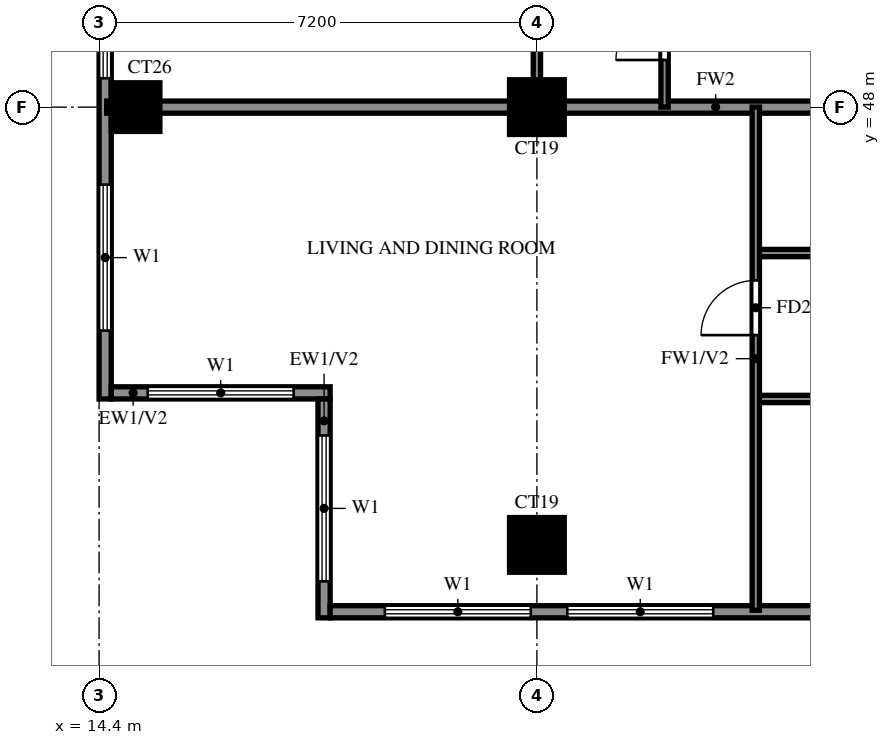
"""IFC4 building model, lengths in metres.
Left out: names, types, materials, properties, quantities, classifications, styles, units other than length and angle.
Written with IfcOpenShell. Run it as: python <this file> out.ifc"""

import sys

from ifc_helpers import new_model, si_unit, direction, frame, frame_2d, origin, origin_2d, place, context, subcontext, project, spatial, rectangle, extrude, source, transform, mapped, element, fill, save


model = new_model("IFC4")
c1 = context("Model", 3, precision=1e-05, world=origin(), true_north=direction((0.0, 1.0)))
c2 = subcontext(c1, "Body", "Model", "MODEL_VIEW")
j1 = project(units=[si_unit("LENGTHUNIT", "METRE"), si_unit("PLANEANGLEUNIT", "RADIAN")], contexts=[c1])
p1 = place(None, origin())
s1 = spatial("IfcSite", under=j1, at=p1, CompositionType="ELEMENT")
p2 = place(p1, origin())
s2 = spatial("IfcBuilding", under=s1, at=p2, CompositionType="ELEMENT")
p3 = place(p2, frame((0.0, 0.0, 199.0)))
s3 = spatial("IfcBuildingStorey", under=s2, at=p3, CompositionType="ELEMENT", Elevation=199.0)
m1 = source(origin(), c2, "Body", "SweptSolid", [
    extrude(rectangle(XDim=0.9, YDim=0.9, at=origin_2d()), origin(), (0.0, 0.0, 1.0), 3.2),
])
p4 = place(p3, frame((21.6, 40.8, 0.0), z_axis=(0.0, 0.0, 1.0), x_axis=(1.0, 0.0, 0.0)))
e1 = element("IfcColumn", 1, at=p4, inside=s3, PredefinedType="COLUMN", context=c2, shape_type="MappedRepresentation", body=[
    mapped(m1, transform((0.0, 0.0, 0.0))),
])
m2 = source(origin(), c2, "Body", "SweptSolid", [
    extrude(rectangle(XDim=0.8, YDim=0.8, at=origin_2d()), origin(), (0.0, 0.0, 1.0), 3.2),
])
p5 = place(p3, frame((15.0, 48.0, 0.0), z_axis=(0.0, 0.0, 1.0), x_axis=(1.0, 0.0, 0.0)))
e2 = element("IfcColumn", 2, at=p5, inside=s3, PredefinedType="COLUMN", context=c2, shape_type="MappedRepresentation", body=[
    mapped(m2, transform((0.0, 0.0, 0.0))),
])
p6 = place(p3, frame((21.6, 48.0, 0.0), z_axis=(0.0, 0.0, 1.0), x_axis=(1.0, 0.0, 0.0)))
e3 = element("IfcColumn", 3, at=p6, inside=s3, PredefinedType="COLUMN", context=c2, shape_type="MappedRepresentation", body=[
    mapped(m1, transform((0.0, 0.0, 0.0))),
])
p7 = place(p3, frame((14.5, 76.6, 0.0), z_axis=(0.0, 0.0, 1.0), x_axis=(0.0, -1.0, 0.0)))
e4 = element("IfcWall", 4, at=p7, inside=s3, PredefinedType="SOLIDWALL", context=c2, shape_type="SweptSolid", body=[
    extrude(rectangle(XDim=33.4, YDim=0.2, at=frame_2d((16.7, 0.0))), origin(), (0.0, 0.0, 1.0), 3.2),
])
p8 = place(p7, frame((22.3, 0.0, 0.0)))
e5 = element("IfcOpeningElement", 5, at=p8, cuts=e4, PredefinedType="OPENING", context=c2, shape_type="SweptSolid", body=[
    extrude(rectangle(XDim=1.8, YDim=2.4, at=frame_2d((0.9, 1.2))), frame((0.0, 0.11, 0.0), z_axis=(0.0, -1.0, 0.0), x_axis=(1.0, 0.0, 0.0)), (0.0, 0.0, 1.0), 0.22),
])
p9 = place(p7, frame((29.875, 0.0, 0.6)))
e6 = element("IfcOpeningElement", 6, at=p9, cuts=e4, PredefinedType="OPENING", context=c2, shape_type="SweptSolid", body=[
    extrude(rectangle(XDim=2.4, YDim=2.4, at=frame_2d((1.2, 1.2))), frame((0.0, 0.11, 0.0), z_axis=(0.0, -1.0, 0.0), x_axis=(1.0, 0.0, 0.0)), (0.0, 0.0, 1.0), 0.22),
])
p10 = place(p7, frame((26.325, 0.0, 0.6)))
e7 = element("IfcOpeningElement", 7, at=p10, cuts=e4, PredefinedType="OPENING", context=c2, shape_type="SweptSolid", body=[
    extrude(rectangle(XDim=1.8, YDim=2.4, at=frame_2d((0.9, 1.2))), frame((0.0, 0.11, 0.0), z_axis=(0.0, -1.0, 0.0), x_axis=(1.0, 0.0, 0.0)), (0.0, 0.0, 1.0), 0.22),
])
p11 = place(p7, frame((17.95, 0.0, 0.6)))
e8 = element("IfcOpeningElement", 8, at=p11, cuts=e4, PredefinedType="OPENING", context=c2, shape_type="SweptSolid", body=[
    extrude(rectangle(XDim=0.9, YDim=2.4, at=frame_2d((0.45, 1.2))), frame((0.0, 0.11, 0.0), z_axis=(0.0, -1.0, 0.0), x_axis=(1.0, 0.0, 0.0)), (0.0, 0.0, 1.0), 0.22),
])
p12 = place(p7, frame((19.725, 0.0, 0.6)))
e9 = element("IfcOpeningElement", 9, at=p12, cuts=e4, PredefinedType="OPENING", context=c2, shape_type="SweptSolid", body=[
    extrude(rectangle(XDim=1.2, YDim=2.4, at=frame_2d((0.6, 1.2))), frame((0.0, 0.11, 0.0), z_axis=(0.0, -1.0, 0.0), x_axis=(1.0, 0.0, 0.0)), (0.0, 0.0, 1.0), 0.22),
])
p13 = place(p7, frame((14.975, 0.0, 0.6)))
e10 = element("IfcOpeningElement", 10, at=p13, cuts=e4, PredefinedType="OPENING", context=c2, shape_type="SweptSolid", body=[
    extrude(rectangle(XDim=2.4, YDim=2.4, at=frame_2d((1.2, 1.2))), frame((0.0, 0.11, 0.0), z_axis=(0.0, -1.0, 0.0), x_axis=(1.0, 0.0, 0.0)), (0.0, 0.0, 1.0), 0.22),
])
p14 = place(p7, frame((11.025, 0.0, 0.6)))
e11 = element("IfcOpeningElement", 11, at=p14, cuts=e4, PredefinedType="OPENING", context=c2, shape_type="SweptSolid", body=[
    extrude(rectangle(XDim=2.4, YDim=2.4, at=frame_2d((1.2, 1.2))), frame((0.0, 0.11, 0.0), z_axis=(0.0, -1.0, 0.0), x_axis=(1.0, 0.0, 0.0)), (0.0, 0.0, 1.0), 0.22),
])
p15 = place(p7, frame((8.525, 0.0, 1.5)))
e12 = element("IfcOpeningElement", 12, at=p15, cuts=e4, PredefinedType="OPENING", context=c2, shape_type="SweptSolid", body=[
    extrude(rectangle(XDim=0.9, YDim=0.9, at=frame_2d((0.45, 0.45))), frame((0.0, 0.11, 0.0), z_axis=(0.0, -1.0, 0.0), x_axis=(1.0, 0.0, 0.0)), (0.0, 0.0, 1.0), 0.22),
])
p16 = place(p7, frame((3.825, 0.0, 0.6)))
e13 = element("IfcOpeningElement", 13, at=p16, cuts=e4, PredefinedType="OPENING", context=c2, shape_type="SweptSolid", body=[
    extrude(rectangle(XDim=2.4, YDim=2.4, at=frame_2d((1.2, 1.2))), frame((0.0, 0.11, 0.0), z_axis=(0.0, -1.0, 0.0), x_axis=(1.0, 0.0, 0.0)), (0.0, 0.0, 1.0), 0.22),
])
p17 = place(p7, frame((0.6, 0.0, 0.6)))
e14 = element("IfcOpeningElement", 14, at=p17, cuts=e4, PredefinedType="OPENING", context=c2, shape_type="SweptSolid", body=[
    extrude(rectangle(XDim=2.4, YDim=2.4, at=frame_2d((1.2, 1.2))), frame((0.0, 0.11, 0.0), z_axis=(0.0, -1.0, 0.0), x_axis=(1.0, 0.0, 0.0)), (0.0, 0.0, 1.0), 0.22),
])
p18 = place(p3, frame((14.6, 43.3, 0.0), z_axis=(0.0, 0.0, 1.0), x_axis=(1.0, 0.0, 0.0)))
e15 = element("IfcWall", 15, at=p18, inside=s3, PredefinedType="SOLIDWALL", context=c2, shape_type="SweptSolid", body=[
    extrude(rectangle(XDim=3.6, YDim=0.2, at=frame_2d((1.8, 0.0))), origin(), (0.0, 0.0, 1.0), 3.2),
])
p19 = place(p18, frame((0.6, 0.0, 0.6)))
e16 = element("IfcOpeningElement", 16, at=p19, cuts=e15, PredefinedType="OPENING", context=c2, shape_type="SweptSolid", body=[
    extrude(rectangle(XDim=2.4, YDim=2.4, at=frame_2d((1.2, 1.2))), frame((0.0, 0.11, 0.0), z_axis=(0.0, -1.0, 0.0), x_axis=(1.0, 0.0, 0.0)), (0.0, 0.0, 1.0), 0.22),
])
p20 = place(p3, frame((18.1, 43.2, 0.0), z_axis=(0.0, 0.0, 1.0), x_axis=(0.0, -1.0, 0.0)))
e17 = element("IfcWall", 17, at=p20, inside=s3, PredefinedType="SOLIDWALL", context=c2, shape_type="SweptSolid", body=[
    extrude(rectangle(XDim=3.6, YDim=0.2, at=frame_2d((1.8, 0.0))), origin(), (0.0, 0.0, 1.0), 3.2),
])
p21 = place(p20, frame((0.6, 0.0, 0.6)))
e18 = element("IfcOpeningElement", 18, at=p21, cuts=e17, PredefinedType="OPENING", context=c2, shape_type="SweptSolid", body=[
    extrude(rectangle(XDim=2.4, YDim=2.4, at=frame_2d((1.2, 1.2))), frame((0.0, 0.11, 0.0), z_axis=(0.0, -1.0, 0.0), x_axis=(1.0, 0.0, 0.0)), (0.0, 0.0, 1.0), 0.22),
])
p22 = place(p3, frame((18.2, 39.7, 0.0), z_axis=(0.0, 0.0, 1.0), x_axis=(1.0, 0.0, 0.0)))
e19 = element("IfcWall", 19, at=p22, inside=s3, PredefinedType="SOLIDWALL", context=c2, shape_type="SweptSolid", body=[
    extrude(rectangle(XDim=23.8, YDim=0.2, at=frame_2d((11.9, 0.0))), origin(), (0.0, 0.0, 1.0), 3.2),
])
p23 = place(p22, frame((13.3, 0.0, 0.0)))
e20 = element("IfcOpeningElement", 20, at=p23, cuts=e19, PredefinedType="OPENING", context=c2, shape_type="SweptSolid", body=[
    extrude(rectangle(XDim=1.8, YDim=2.4, at=frame_2d((0.9, 1.2))), frame((0.0, 0.11, 0.0), z_axis=(0.0, -1.0, 0.0), x_axis=(1.0, 0.0, 0.0)), (0.0, 0.0, 1.0), 0.22),
])
p24 = place(p22, frame((0.9, 0.0, 0.6)))
e21 = element("IfcOpeningElement", 21, at=p24, cuts=e19, PredefinedType="OPENING", context=c2, shape_type="SweptSolid", body=[
    extrude(rectangle(XDim=2.4, YDim=2.4, at=frame_2d((1.2, 1.2))), frame((0.0, 0.11, 0.0), z_axis=(0.0, -1.0, 0.0), x_axis=(1.0, 0.0, 0.0)), (0.0, 0.0, 1.0), 0.22),
])
p25 = place(p22, frame((3.9, 0.0, 0.6)))
e22 = element("IfcOpeningElement", 22, at=p25, cuts=e19, PredefinedType="OPENING", context=c2, shape_type="SweptSolid", body=[
    extrude(rectangle(XDim=2.4, YDim=2.4, at=frame_2d((1.2, 1.2))), frame((0.0, 0.11, 0.0), z_axis=(0.0, -1.0, 0.0), x_axis=(1.0, 0.0, 0.0)), (0.0, 0.0, 1.0), 0.22),
])
p26 = place(p22, frame((11.5, 0.0, 0.6)))
e23 = element("IfcOpeningElement", 23, at=p26, cuts=e19, PredefinedType="OPENING", context=c2, shape_type="SweptSolid", body=[
    extrude(rectangle(XDim=1.2, YDim=2.4, at=frame_2d((0.6, 1.2))), frame((0.0, 0.11, 0.0), z_axis=(0.0, -1.0, 0.0), x_axis=(1.0, 0.0, 0.0)), (0.0, 0.0, 1.0), 0.22),
])
p27 = place(p22, frame((8.35, 0.0, 1.5)))
e24 = element("IfcOpeningElement", 24, at=p27, cuts=e19, PredefinedType="OPENING", context=c2, shape_type="SweptSolid", body=[
    extrude(rectangle(XDim=0.9, YDim=0.9, at=frame_2d((0.45, 0.45))), frame((0.0, 0.11, 0.0), z_axis=(0.0, -1.0, 0.0), x_axis=(1.0, 0.0, 0.0)), (0.0, 0.0, 1.0), 0.22),
])
p28 = place(p3, frame((14.525, 48.0, 0.0), z_axis=(0.0, 0.0, 1.0), x_axis=(1.0, 0.0, 0.0)))
e25 = element("IfcWall", 25, at=p28, inside=s3, PredefinedType="SOLIDWALL", context=c2, shape_type="SweptSolid", body=[
    extrude(rectangle(XDim=19.075, YDim=0.2, at=frame_2d((9.538, 0.0))), origin(), (0.0, 0.0, 1.0), 3.2),
])
p29 = place(p3, frame((25.2, 43.2, 0.0), z_axis=(0.0, 0.0, 1.0), x_axis=(1.0, 0.0, 0.0)))
e26 = element("IfcWall", 26, at=p29, inside=s3, PredefinedType="PARTITIONING", context=c2, shape_type="SweptSolid", body=[
    extrude(rectangle(XDim=3.6, YDim=0.12, at=frame_2d((1.8, 0.0))), origin(), (0.0, 0.0, 1.0), 3.2),
])
p30 = place(p3, frame((25.2, 45.6, 0.0), z_axis=(0.0, 0.0, 1.0), x_axis=(1.0, 0.0, 0.0)))
e27 = element("IfcWall", 27, at=p30, inside=s3, PredefinedType="PARTITIONING", context=c2, shape_type="SweptSolid", body=[
    extrude(rectangle(XDim=6.0, YDim=0.12, at=frame_2d((3.0, 0.0))), origin(), (0.0, 0.0, 1.0), 3.2),
])
p31 = place(p30, frame((2.55, 0.0, 0.0)))
e28 = element("IfcOpeningElement", 28, at=p31, cuts=e27, PredefinedType="OPENING", context=c2, shape_type="SweptSolid", body=[
    extrude(rectangle(XDim=0.9, YDim=2.1, at=frame_2d((0.45, 1.05))), frame((0.0, 0.07, 0.0), z_axis=(0.0, -1.0, 0.0), x_axis=(1.0, 0.0, 0.0)), (0.0, 0.0, 1.0), 0.14),
])
p32 = place(p3, frame((21.6, 48.0, 0.0), z_axis=(0.0, 0.0, 1.0), x_axis=(0.0, 1.0, 0.0)))
e29 = element("IfcWall", 29, at=p32, inside=s3, PredefinedType="PARTITIONING", context=c2, shape_type="SweptSolid", body=[
    extrude(rectangle(XDim=18.0, YDim=0.12, at=frame_2d((9.0, 0.0))), origin(), (0.0, 0.0, 1.0), 3.2),
])
p33 = place(p32, frame((1.35, 0.0, 0.0)))
e30 = element("IfcOpeningElement", 30, at=p33, cuts=e29, PredefinedType="OPENING", context=c2, shape_type="SweptSolid", body=[
    extrude(rectangle(XDim=0.9, YDim=2.1, at=frame_2d((0.45, 1.05))), frame((0.0, 0.07, 0.0), z_axis=(0.0, -1.0, 0.0), x_axis=(1.0, 0.0, 0.0)), (0.0, 0.0, 1.0), 0.14),
])
p34 = place(p32, frame((7.95, 0.0, 0.0)))
e31 = element("IfcOpeningElement", 31, at=p34, cuts=e29, PredefinedType="OPENING", context=c2, shape_type="SweptSolid", body=[
    extrude(rectangle(XDim=1.5, YDim=2.1, at=frame_2d((0.75, 1.05))), frame((0.0, 0.07, 0.0), z_axis=(0.0, -1.0, 0.0), x_axis=(1.0, 0.0, 0.0)), (0.0, 0.0, 1.0), 0.14),
])
p35 = place(p32, frame((12.15, 0.0, 0.0)))
e32 = element("IfcOpeningElement", 32, at=p35, cuts=e29, PredefinedType="OPENING", context=c2, shape_type="SweptSolid", body=[
    extrude(rectangle(XDim=0.9, YDim=2.1, at=frame_2d((0.45, 1.05))), frame((0.0, 0.07, 0.0), z_axis=(0.0, -1.0, 0.0), x_axis=(1.0, 0.0, 0.0)), (0.0, 0.0, 1.0), 0.14),
])
p36 = place(p32, frame((15.75, 0.0, 0.0)))
e33 = element("IfcOpeningElement", 33, at=p36, cuts=e29, PredefinedType="OPENING", context=c2, shape_type="SweptSolid", body=[
    extrude(rectangle(XDim=0.9, YDim=2.1, at=frame_2d((0.45, 1.05))), frame((0.0, 0.07, 0.0), z_axis=(0.0, -1.0, 0.0), x_axis=(1.0, 0.0, 0.0)), (0.0, 0.0, 1.0), 0.14),
])
p37 = place(p3, frame((23.7, 48.0, 0.0), z_axis=(0.0, 0.0, 1.0), x_axis=(0.0, 1.0, 0.0)))
e34 = element("IfcWall", 34, at=p37, inside=s3, PredefinedType="PARTITIONING", context=c2, shape_type="SweptSolid", body=[
    extrude(rectangle(XDim=5.2, YDim=0.12, at=frame_2d((2.6, 0.0))), origin(), (0.0, 0.0, 1.0), 3.2),
])
p38 = place(p37, frame((0.775, 0.0, 0.0)))
e35 = element("IfcOpeningElement", 35, at=p38, cuts=e34, PredefinedType="OPENING", context=c2, shape_type="SweptSolid", body=[
    extrude(rectangle(XDim=0.8, YDim=2.1, at=frame_2d((0.4, 1.05))), frame((0.0, 0.07, 0.0), z_axis=(0.0, -1.0, 0.0), x_axis=(1.0, 0.0, 0.0)), (0.0, 0.0, 1.0), 0.14),
])
p39 = place(p3, frame((25.2, 39.725, 0.0), z_axis=(0.0, 0.0, 1.0), x_axis=(0.0, 1.0, 0.0)))
e36 = element("IfcWall", 36, at=p39, inside=s3, PredefinedType="PARTITIONING", context=c2, shape_type="SweptSolid", body=[
    extrude(rectangle(XDim=8.275, YDim=0.12, at=frame_2d((4.137, 0.0))), origin(), (0.0, 0.0, 1.0), 3.2),
])
p40 = place(p39, frame((4.525, 0.0, 0.0)))
e37 = element("IfcOpeningElement", 37, at=p40, cuts=e36, PredefinedType="OPENING", context=c2, shape_type="SweptSolid", body=[
    extrude(rectangle(XDim=0.9, YDim=2.1, at=frame_2d((0.45, 1.05))), frame((0.0, 0.07, 0.0), z_axis=(0.0, -1.0, 0.0), x_axis=(1.0, 0.0, 0.0)), (0.0, 0.0, 1.0), 0.14),
])
p41 = place(p9, origin())
e38 = element("IfcWindow", 38, at=p41, inside=s3, PartitioningType="DOUBLE_PANEL_VERTICAL", PredefinedType="WINDOW", context=c2, shape_type="SweptSolid", body=[
    extrude(rectangle(XDim=2.4, YDim=2.4, at=frame_2d((1.2, 1.2))), frame((0.0, 0.03, 0.0), z_axis=(0.0, -1.0, 0.0), x_axis=(1.0, 0.0, 0.0)), (0.0, 0.0, 1.0), 0.06),
])
fill(e6, e38)
p42 = place(p10, origin())
e39 = element("IfcWindow", 39, at=p42, inside=s3, PartitioningType="DOUBLE_PANEL_VERTICAL", PredefinedType="WINDOW", context=c2, shape_type="SweptSolid", body=[
    extrude(rectangle(XDim=1.8, YDim=2.4, at=frame_2d((0.9, 1.2))), frame((0.0, 0.03, 0.0), z_axis=(0.0, -1.0, 0.0), x_axis=(1.0, 0.0, 0.0)), (0.0, 0.0, 1.0), 0.06),
])
fill(e7, e39)
p43 = place(p19, origin())
e40 = element("IfcWindow", 40, at=p43, inside=s3, PartitioningType="DOUBLE_PANEL_VERTICAL", PredefinedType="WINDOW", context=c2, shape_type="SweptSolid", body=[
    extrude(rectangle(XDim=2.4, YDim=2.4, at=frame_2d((1.2, 1.2))), frame((0.0, 0.03, 0.0), z_axis=(0.0, -1.0, 0.0), x_axis=(1.0, 0.0, 0.0)), (0.0, 0.0, 1.0), 0.06),
])
fill(e16, e40)
p44 = place(p21, origin())
e41 = element("IfcWindow", 41, at=p44, inside=s3, PartitioningType="DOUBLE_PANEL_VERTICAL", PredefinedType="WINDOW", context=c2, shape_type="SweptSolid", body=[
    extrude(rectangle(XDim=2.4, YDim=2.4, at=frame_2d((1.2, 1.2))), frame((0.0, 0.03, 0.0), z_axis=(0.0, -1.0, 0.0), x_axis=(1.0, 0.0, 0.0)), (0.0, 0.0, 1.0), 0.06),
])
fill(e18, e41)
p45 = place(p24, origin())
e42 = element("IfcWindow", 42, at=p45, inside=s3, PartitioningType="DOUBLE_PANEL_VERTICAL", PredefinedType="WINDOW", context=c2, shape_type="SweptSolid", body=[
    extrude(rectangle(XDim=2.4, YDim=2.4, at=frame_2d((1.2, 1.2))), frame((0.0, 0.03, 0.0), z_axis=(0.0, -1.0, 0.0), x_axis=(1.0, 0.0, 0.0)), (0.0, 0.0, 1.0), 0.06),
])
fill(e21, e42)
p46 = place(p25, origin())
e43 = element("IfcWindow", 43, at=p46, inside=s3, PartitioningType="DOUBLE_PANEL_VERTICAL", PredefinedType="WINDOW", context=c2, shape_type="SweptSolid", body=[
    extrude(rectangle(XDim=2.4, YDim=2.4, at=frame_2d((1.2, 1.2))), frame((0.0, 0.03, 0.0), z_axis=(0.0, -1.0, 0.0), x_axis=(1.0, 0.0, 0.0)), (0.0, 0.0, 1.0), 0.06),
])
fill(e22, e43)
p47 = place(p40, origin())
e44 = element("IfcDoor", 44, at=p47, inside=s3, OperationType="SINGLE_SWING_RIGHT", PredefinedType="DOOR", context=c2, shape_type="SweptSolid", body=[
    extrude(rectangle(XDim=0.9, YDim=2.1, at=frame_2d((0.45, 1.05))), frame((0.0, 0.025, 0.0), z_axis=(0.0, -1.0, 0.0), x_axis=(1.0, 0.0, 0.0)), (0.0, 0.0, 1.0), 0.05),
])
fill(e37, e44)
p48 = place(p38, origin())
e45 = element("IfcDoor", 45, at=p48, inside=s3, OperationType="SINGLE_SWING_RIGHT", PredefinedType="DOOR", context=c2, shape_type="SweptSolid", body=[
    extrude(rectangle(XDim=0.8, YDim=2.1, at=frame_2d((0.4, 1.05))), frame((0.0, 0.025, 0.0), z_axis=(0.0, -1.0, 0.0), x_axis=(1.0, 0.0, 0.0)), (0.0, 0.0, 1.0), 0.05),
])
fill(e35, e45)
save(model, sys.argv[1])
